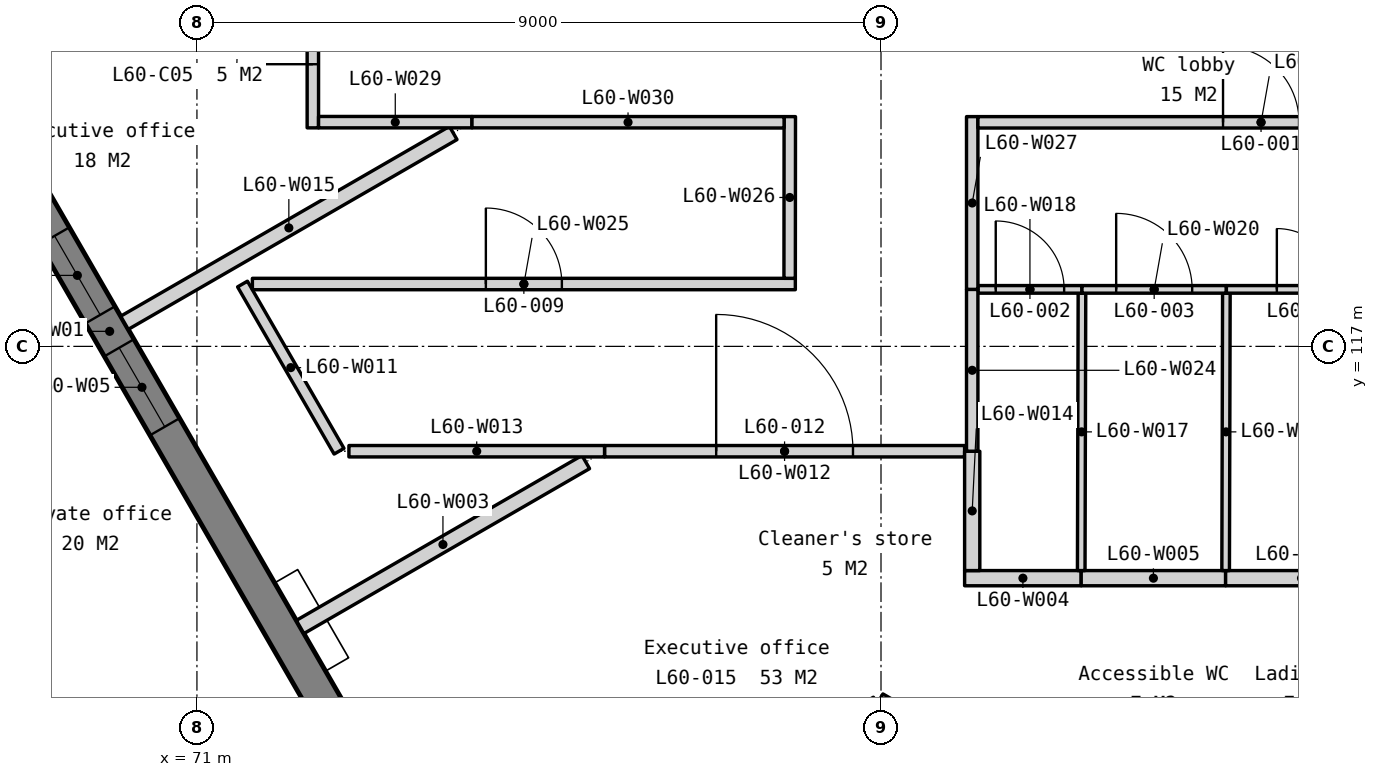
"""IFC4 building model, lengths in metres.
Left out: names, types, materials, properties, quantities, classifications, styles, units other than length and angle.
Written with IfcOpenShell. Run it as: python <this file> out.ifc"""

import sys

from ifc_helpers import new_model, si_unit, direction, frame, frame_2d, origin, place, context, subcontext, project, spatial, polyline, rectangle, outline, extrude, element, fill, save


model = new_model("IFC4")
c1 = context("Model", 3, precision=1e-05, world=origin(), true_north=direction((0.0, 1.0)))
c2 = subcontext(c1, "Body", "Model", "MODEL_VIEW")
j1 = project(units=[si_unit("LENGTHUNIT", "METRE"), si_unit("PLANEANGLEUNIT", "RADIAN")], contexts=[c1])
p1 = place(None, origin())
s1 = spatial("IfcSite", under=j1, at=p1, CompositionType="ELEMENT")
p2 = place(p1, origin())
s2 = spatial("IfcBuilding", under=s1, at=p2, CompositionType="ELEMENT")
p3 = place(p2, frame((0.0, 0.0, 246.5)))
s3 = spatial("IfcBuildingStorey", under=s2, at=p3, CompositionType="ELEMENT", Elevation=246.5)
p4 = place(p3, frame((60.609, 133.207, -0.15), z_axis=(0.0, 0.0, 1.0), x_axis=(0.500002536638, -0.866023939251, 0.0)))
e1 = element("IfcWall", 1, at=p4, inside=s3, PredefinedType="SOLIDWALL", context=c2, shape_type="SweptSolid", body=[
    extrude(outline(polyline([(36.972, 0.0), (36.972, 3.9), (0.0, 3.9), (0.0, 0.0), (36.972, 0.0)])), frame((0.0, 0.225, 0.0), z_axis=(0.0, -1.0, 0.0), x_axis=(1.0, 0.0, 0.0)), (0.0, 0.0, 1.0), 0.45),
])
p5 = place(p4, frame((0.744, 0.0, 0.95)))
e2 = element("IfcOpeningElement", 2, at=p5, cuts=e1, PredefinedType="OPENING", context=c2, shape_type="SweptSolid", body=[
    extrude(rectangle(XDim=1.2, YDim=2.2, at=frame_2d((0.6, 1.1))), frame((0.0, 0.235, 0.0), z_axis=(0.0, -1.0, 0.0), x_axis=(1.0, 0.0, 0.0)), (0.0, 0.0, 1.0), 0.47),
])
p6 = place(p4, frame((7.793, 0.0, 0.95)))
e3 = element("IfcOpeningElement", 3, at=p6, cuts=e1, PredefinedType="OPENING", context=c2, shape_type="SweptSolid", body=[
    extrude(rectangle(XDim=1.2, YDim=2.2, at=frame_2d((0.6, 1.1))), frame((0.0, 0.235, 0.0), z_axis=(0.0, -1.0, 0.0), x_axis=(1.0, 0.0, 0.0)), (0.0, 0.0, 1.0), 0.47),
])
p7 = place(p4, frame((9.493, 0.0, 0.95)))
e4 = element("IfcOpeningElement", 4, at=p7, cuts=e1, PredefinedType="OPENING", context=c2, shape_type="SweptSolid", body=[
    extrude(rectangle(XDim=1.2, YDim=2.2, at=frame_2d((0.6, 1.1))), frame((0.0, 0.235, 0.0), z_axis=(0.0, -1.0, 0.0), x_axis=(1.0, 0.0, 0.0)), (0.0, 0.0, 1.0), 0.47),
])
p8 = place(p4, frame((17.036, 0.0, 0.95)))
e5 = element("IfcOpeningElement", 5, at=p8, cuts=e1, PredefinedType="OPENING", context=c2, shape_type="SweptSolid", body=[
    extrude(rectangle(XDim=1.2, YDim=2.2, at=frame_2d((0.6, 1.1))), frame((0.0, 0.235, 0.0), z_axis=(0.0, -1.0, 0.0), x_axis=(1.0, 0.0, 0.0)), (0.0, 0.0, 1.0), 0.47),
])
p9 = place(p4, frame((18.736, 0.0, 0.95)))
e6 = element("IfcOpeningElement", 6, at=p9, cuts=e1, PredefinedType="OPENING", context=c2, shape_type="SweptSolid", body=[
    extrude(rectangle(XDim=1.2, YDim=2.2, at=frame_2d((0.6, 1.1))), frame((0.0, 0.235, 0.0), z_axis=(0.0, -1.0, 0.0), x_axis=(1.0, 0.0, 0.0)), (0.0, 0.0, 1.0), 0.47),
])
p10 = place(p4, frame((26.279, 0.0, 0.95)))
e7 = element("IfcOpeningElement", 7, at=p10, cuts=e1, PredefinedType="OPENING", context=c2, shape_type="SweptSolid", body=[
    extrude(rectangle(XDim=1.2, YDim=2.2, at=frame_2d((0.6, 1.1))), frame((0.0, 0.235, 0.0), z_axis=(0.0, -1.0, 0.0), x_axis=(1.0, 0.0, 0.0)), (0.0, 0.0, 1.0), 0.47),
])
p11 = place(p4, frame((27.979, 0.0, 0.95)))
e8 = element("IfcOpeningElement", 8, at=p11, cuts=e1, PredefinedType="OPENING", context=c2, shape_type="SweptSolid", body=[
    extrude(rectangle(XDim=1.2, YDim=2.2, at=frame_2d((0.6, 1.1))), frame((0.0, 0.235, 0.0), z_axis=(0.0, -1.0, 0.0), x_axis=(1.0, 0.0, 0.0)), (0.0, 0.0, 1.0), 0.47),
])
p12 = place(p4, frame((35.028, 0.0, 0.95)))
e9 = element("IfcOpeningElement", 9, at=p12, cuts=e1, PredefinedType="OPENING", context=c2, shape_type="SweptSolid", body=[
    extrude(rectangle(XDim=1.2, YDim=2.2, at=frame_2d((0.6, 1.1))), frame((0.0, 0.235, 0.0), z_axis=(0.0, -1.0, 0.0), x_axis=(1.0, 0.0, 0.0)), (0.0, 0.0, 1.0), 0.47),
])
p13 = place(p3, frame((80.905, 101.188, -0.15), z_axis=(0.0, 0.0, 1.0), x_axis=(0.500002536638, 0.866023939251, 0.0)))
e10 = element("IfcWall", 10, at=p13, inside=s3, PredefinedType="SOLIDWALL", context=c2, shape_type="SweptSolid", body=[
    extrude(outline(polyline([(36.972, 0.0), (36.972, 3.9), (0.0, 3.9), (0.0, 0.0), (36.972, 0.0)])), frame((0.0, 0.225, 0.0), z_axis=(0.0, -1.0, 0.0), x_axis=(1.0, 0.0, 0.0)), (0.0, 0.0, 1.0), 0.45),
])
p14 = place(p13, frame((0.744, 0.0, 0.95)))
e11 = element("IfcOpeningElement", 11, at=p14, cuts=e10, PredefinedType="OPENING", context=c2, shape_type="SweptSolid", body=[
    extrude(rectangle(XDim=1.2, YDim=2.2, at=frame_2d((0.6, 1.1))), frame((0.0, 0.235, 0.0), z_axis=(0.0, -1.0, 0.0), x_axis=(1.0, 0.0, 0.0)), (0.0, 0.0, 1.0), 0.47),
])
p15 = place(p13, frame((7.793, 0.0, 0.95)))
e12 = element("IfcOpeningElement", 12, at=p15, cuts=e10, PredefinedType="OPENING", context=c2, shape_type="SweptSolid", body=[
    extrude(rectangle(XDim=1.2, YDim=2.2, at=frame_2d((0.6, 1.1))), frame((0.0, 0.235, 0.0), z_axis=(0.0, -1.0, 0.0), x_axis=(1.0, 0.0, 0.0)), (0.0, 0.0, 1.0), 0.47),
])
p16 = place(p13, frame((9.493, 0.0, 0.95)))
e13 = element("IfcOpeningElement", 13, at=p16, cuts=e10, PredefinedType="OPENING", context=c2, shape_type="SweptSolid", body=[
    extrude(rectangle(XDim=1.2, YDim=2.2, at=frame_2d((0.6, 1.1))), frame((0.0, 0.235, 0.0), z_axis=(0.0, -1.0, 0.0), x_axis=(1.0, 0.0, 0.0)), (0.0, 0.0, 1.0), 0.47),
])
p17 = place(p13, frame((17.036, 0.0, 0.95)))
e14 = element("IfcOpeningElement", 14, at=p17, cuts=e10, PredefinedType="OPENING", context=c2, shape_type="SweptSolid", body=[
    extrude(rectangle(XDim=1.2, YDim=2.2, at=frame_2d((0.6, 1.1))), frame((0.0, 0.235, 0.0), z_axis=(0.0, -1.0, 0.0), x_axis=(1.0, 0.0, 0.0)), (0.0, 0.0, 1.0), 0.47),
])
p18 = place(p13, frame((18.736, 0.0, 0.95)))
e15 = element("IfcOpeningElement", 15, at=p18, cuts=e10, PredefinedType="OPENING", context=c2, shape_type="SweptSolid", body=[
    extrude(rectangle(XDim=1.2, YDim=2.2, at=frame_2d((0.6, 1.1))), frame((0.0, 0.235, 0.0), z_axis=(0.0, -1.0, 0.0), x_axis=(1.0, 0.0, 0.0)), (0.0, 0.0, 1.0), 0.47),
])
p19 = place(p13, frame((26.279, 0.0, 0.95)))
e16 = element("IfcOpeningElement", 16, at=p19, cuts=e10, PredefinedType="OPENING", context=c2, shape_type="SweptSolid", body=[
    extrude(rectangle(XDim=1.2, YDim=2.2, at=frame_2d((0.6, 1.1))), frame((0.0, 0.235, 0.0), z_axis=(0.0, -1.0, 0.0), x_axis=(1.0, 0.0, 0.0)), (0.0, 0.0, 1.0), 0.47),
])
p20 = place(p13, frame((27.979, 0.0, 0.95)))
e17 = element("IfcOpeningElement", 17, at=p20, cuts=e10, PredefinedType="OPENING", context=c2, shape_type="SweptSolid", body=[
    extrude(rectangle(XDim=1.2, YDim=2.2, at=frame_2d((0.6, 1.1))), frame((0.0, 0.235, 0.0), z_axis=(0.0, -1.0, 0.0), x_axis=(1.0, 0.0, 0.0)), (0.0, 0.0, 1.0), 0.47),
])
p21 = place(p13, frame((35.028, 0.0, 0.95)))
e18 = element("IfcOpeningElement", 18, at=p21, cuts=e10, PredefinedType="OPENING", context=c2, shape_type="SweptSolid", body=[
    extrude(rectangle(XDim=1.2, YDim=2.2, at=frame_2d((0.6, 1.1))), frame((0.0, 0.235, 0.0), z_axis=(0.0, -1.0, 0.0), x_axis=(1.0, 0.0, 0.0)), (0.0, 0.0, 1.0), 0.47),
])
p22 = place(p3, frame((80.0, 112.384, 0.0), z_axis=(0.0, 0.0, 1.0), x_axis=(0.866021154418, -0.500007360046, 0.0)))
e19 = element("IfcWall", 19, at=p22, inside=s3, PredefinedType="PARTITIONING", context=c2, shape_type="SweptSolid", body=[
    extrude(rectangle(XDim=6.157, YDim=0.1, at=frame_2d((3.078, 0.0))), origin(), (0.0, 0.0, 1.0), 3.75),
])
p23 = place(p22, frame((2.578, 0.0, 0.0)))
e20 = element("IfcOpeningElement", 20, at=p23, cuts=e19, PredefinedType="OPENING", context=c2, shape_type="SweptSolid", body=[
    extrude(rectangle(XDim=1.0, YDim=2.1, at=frame_2d((0.5, 1.05))), frame((0.0, 0.06, 0.0), z_axis=(0.0, -1.0, 0.0), x_axis=(1.0, 0.0, 0.0)), (0.0, 0.0, 1.0), 0.12),
])
p24 = place(p3, frame((72.357, 113.308, 0.0), z_axis=(0.0, 0.0, 1.0), x_axis=(0.866032891431, 0.499987030792, 0.0)))
e21 = element("IfcWall", 21, at=p24, inside=s3, PredefinedType="PARTITIONING", context=c2, shape_type="SweptSolid", body=[
    extrude(rectangle(XDim=4.34, YDim=0.2, at=frame_2d((2.17, 0.0))), origin(), (0.0, 0.0, 1.0), 3.75),
])
p25 = place(p3, frame((81.1, 113.95, 0.0), z_axis=(0.0, 0.0, 1.0), x_axis=(1.0, 0.0, 0.0)))
e22 = element("IfcWall", 22, at=p25, inside=s3, PredefinedType="PARTITIONING", context=c2, shape_type="SweptSolid", body=[
    extrude(rectangle(XDim=1.534, YDim=0.2, at=frame_2d((0.767, 0.0))), origin(), (0.0, 0.0, 1.0), 3.75),
])
p26 = place(p3, frame((82.634, 113.95, 0.0), z_axis=(0.0, 0.0, 1.0), x_axis=(1.0, 0.0, 0.0)))
e23 = element("IfcWall", 23, at=p26, inside=s3, PredefinedType="PARTITIONING", context=c2, shape_type="SweptSolid", body=[
    extrude(rectangle(XDim=1.9, YDim=0.2, at=frame_2d((0.95, 0.0))), origin(), (0.0, 0.0, 1.0), 3.75),
])
p27 = place(p3, frame((84.534, 113.95, 0.0), z_axis=(0.0, 0.0, 1.0), x_axis=(1.0, 0.0, 0.0)))
e24 = element("IfcWall", 24, at=p27, inside=s3, PredefinedType="PARTITIONING", context=c2, shape_type="SweptSolid", body=[
    extrude(rectangle(XDim=1.997, YDim=0.2, at=frame_2d((0.998, 0.0))), origin(), (0.0, 0.0, 1.0), 3.75),
])
p28 = place(p3, frame((71.6, 117.82, 0.0), z_axis=(0.0, 0.0, 1.0), x_axis=(0.500035802948, -0.866004731956, 0.0)))
e25 = element("IfcWall", 25, at=p28, inside=s3, PredefinedType="PARTITIONING", context=c2, shape_type="SweptSolid", body=[
    extrude(rectangle(XDim=2.54, YDim=0.15, at=frame_2d((1.27, 0.0))), origin(), (0.0, 0.0, 1.0), 3.75),
])
p29 = place(p3, frame((76.363, 115.62, 0.0), z_axis=(0.0, 0.0, 1.0), x_axis=(1.0, 0.0, 0.0)))
e26 = element("IfcWall", 26, at=p29, inside=s3, PredefinedType="PARTITIONING", context=c2, shape_type="SweptSolid", body=[
    extrude(rectangle(XDim=4.737, YDim=0.15, at=frame_2d((2.369, 0.0))), origin(), (0.0, 0.0, 1.0), 3.75),
])
p30 = place(p29, frame((1.469, 0.0, 0.0)))
e27 = element("IfcOpeningElement", 27, at=p30, cuts=e26, PredefinedType="OPENING", context=c2, shape_type="SweptSolid", body=[
    extrude(rectangle(XDim=1.8, YDim=2.1, at=frame_2d((0.9, 1.05))), frame((0.0, 0.085, 0.0), z_axis=(0.0, -1.0, 0.0), x_axis=(1.0, 0.0, 0.0)), (0.0, 0.0, 1.0), 0.17),
])
p31 = place(p3, frame((73.0, 115.62, 0.0), z_axis=(0.0, 0.0, 1.0), x_axis=(1.0, 0.0, 0.0)))
e28 = element("IfcWall", 28, at=p31, inside=s3, PredefinedType="PARTITIONING", context=c2, shape_type="SweptSolid", body=[
    extrude(rectangle(XDim=3.363, YDim=0.15, at=frame_2d((1.682, 0.0))), origin(), (0.0, 0.0, 1.0), 3.75),
])
p32 = place(p3, frame((81.2, 114.05, 0.0), z_axis=(0.0, 0.0, 1.0), x_axis=(0.0, 1.0, 0.0)))
e29 = element("IfcWall", 29, at=p32, inside=s3, PredefinedType="PARTITIONING", context=c2, shape_type="SweptSolid", body=[
    extrude(rectangle(XDim=1.57, YDim=0.2, at=frame_2d((0.785, 0.0))), origin(), (0.0, 0.0, 1.0), 3.75),
])
p33 = place(p3, frame((70.047, 117.31, 0.0), z_axis=(0.0, 0.0, 1.0), x_axis=(0.866032544947, 0.499987630939, 0.0)))
e30 = element("IfcWall", 30, at=p33, inside=s3, PredefinedType="PARTITIONING", context=c2, shape_type="SweptSolid", body=[
    extrude(rectangle(XDim=4.994, YDim=0.2, at=frame_2d((2.497, 0.0))), origin(), (0.0, 0.0, 1.0), 3.75),
])
p34 = place(p3, frame((82.634, 114.05, 0.0), z_axis=(0.0, 0.0, 1.0), x_axis=(0.002608686776, 0.999996597371, 0.0)))
e31 = element("IfcWall", 31, at=p34, inside=s3, PredefinedType="PARTITIONING", context=c2, shape_type="SweptSolid", body=[
    extrude(rectangle(XDim=3.65, YDim=0.1, at=frame_2d((1.825, 0.0))), origin(), (0.0, 0.0, 1.0), 3.75),
])
p35 = place(p3, frame((81.275, 117.75, 0.0), z_axis=(0.0, 0.0, 1.0), x_axis=(1.0, 0.0, 0.0)))
e32 = element("IfcWall", 32, at=p35, inside=s3, PredefinedType="PARTITIONING", context=c2, shape_type="SweptSolid", body=[
    extrude(rectangle(XDim=1.369, YDim=0.1, at=frame_2d((0.685, 0.0))), origin(), (0.0, 0.0, 1.0), 3.75),
])
p36 = place(p35, frame((0.235, 0.0, 0.0)))
e33 = element("IfcOpeningElement", 33, at=p36, cuts=e32, PredefinedType="OPENING", context=c2, shape_type="SweptSolid", body=[
    extrude(rectangle(XDim=0.9, YDim=2.1, at=frame_2d((0.45, 1.05))), frame((0.0, 0.06, 0.0), z_axis=(0.0, -1.0, 0.0), x_axis=(1.0, 0.0, 0.0)), (0.0, 0.0, 1.0), 0.12),
])
p37 = place(p3, frame((84.534, 114.05, 0.0), z_axis=(0.0, 0.0, 1.0), x_axis=(0.002675575707, 0.999996420641, 0.0)))
e34 = element("IfcWall", 34, at=p37, inside=s3, PredefinedType="PARTITIONING", context=c2, shape_type="SweptSolid", body=[
    extrude(rectangle(XDim=3.65, YDim=0.1, at=frame_2d((1.825, 0.0))), origin(), (0.0, 0.0, 1.0), 3.75),
])
p38 = place(p3, frame((82.644, 117.75, 0.0), z_axis=(0.0, 0.0, 1.0), x_axis=(1.0, 0.0, 0.0)))
e35 = element("IfcWall", 35, at=p38, inside=s3, PredefinedType="PARTITIONING", context=c2, shape_type="SweptSolid", body=[
    extrude(rectangle(XDim=1.9, YDim=0.1, at=frame_2d((0.95, 0.0))), origin(), (0.0, 0.0, 1.0), 3.75),
])
p39 = place(p38, frame((0.45, 0.0, 0.0)))
e36 = element("IfcOpeningElement", 36, at=p39, cuts=e35, PredefinedType="OPENING", context=c2, shape_type="SweptSolid", body=[
    extrude(rectangle(XDim=1.0, YDim=2.1, at=frame_2d((0.5, 1.05))), frame((0.0, 0.06, 0.0), z_axis=(0.0, -1.0, 0.0), x_axis=(1.0, 0.0, 0.0)), (0.0, 0.0, 1.0), 0.12),
])
p40 = place(p3, frame((84.544, 117.75, 0.0), z_axis=(0.0, 0.0, 1.0), x_axis=(1.0, 0.0, 0.0)))
e37 = element("IfcWall", 37, at=p40, inside=s3, PredefinedType="PARTITIONING", context=c2, shape_type="SweptSolid", body=[
    extrude(rectangle(XDim=2.128, YDim=0.1, at=frame_2d((1.064, 0.0))), origin(), (0.0, 0.0, 1.0), 3.75),
])
p41 = place(p40, frame((0.664, 0.0, 0.0)))
e38 = element("IfcOpeningElement", 38, at=p41, cuts=e37, PredefinedType="OPENING", context=c2, shape_type="SweptSolid", body=[
    extrude(rectangle(XDim=0.8, YDim=2.1, at=frame_2d((0.4, 1.05))), frame((0.0, 0.06, 0.0), z_axis=(0.0, -1.0, 0.0), x_axis=(1.0, 0.0, 0.0)), (0.0, 0.0, 1.0), 0.12),
])
p42 = place(p3, frame((81.2, 115.62, 0.0), z_axis=(0.0, 0.0, 1.0), x_axis=(0.0, 1.0, 0.0)))
e39 = element("IfcWall", 39, at=p42, inside=s3, PredefinedType="PARTITIONING", context=c2, shape_type="SweptSolid", body=[
    extrude(rectangle(XDim=2.13, YDim=0.15, at=frame_2d((1.065, 0.0))), origin(), (0.0, 0.0, 1.0), 3.75),
])
p43 = place(p3, frame((71.729, 117.82, 0.0), z_axis=(0.0, 0.0, 1.0), x_axis=(1.0, 0.0, 0.0)))
e40 = element("IfcWall", 40, at=p43, inside=s3, PredefinedType="PARTITIONING", context=c2, shape_type="SweptSolid", body=[
    extrude(rectangle(XDim=7.144, YDim=0.15, at=frame_2d((3.572, 0.0))), origin(), (0.0, 0.0, 1.0), 3.75),
])
p44 = place(p43, frame((3.072, 0.0, 0.0)))
e41 = element("IfcOpeningElement", 41, at=p44, cuts=e40, PredefinedType="OPENING", context=c2, shape_type="SweptSolid", body=[
    extrude(rectangle(XDim=1.0, YDim=2.1, at=frame_2d((0.5, 1.05))), frame((0.0, 0.085, 0.0), z_axis=(0.0, -1.0, 0.0), x_axis=(1.0, 0.0, 0.0)), (0.0, 0.0, 1.0), 0.17),
])
p45 = place(p3, frame((78.798, 117.895, 0.0), z_axis=(0.0, 0.0, 1.0), x_axis=(0.000917957158, 0.999999578677, 0.0)))
e42 = element("IfcWall", 42, at=p45, inside=s3, PredefinedType="PARTITIONING", context=c2, shape_type="SweptSolid", body=[
    extrude(rectangle(XDim=2.128, YDim=0.15, at=frame_2d((1.064, 0.0))), origin(), (0.0, 0.0, 1.0), 3.75),
])
p46 = place(p3, frame((81.2, 117.75, 0.0), z_axis=(0.0, 0.0, 1.0), x_axis=(0.0, 1.0, 0.0)))
e43 = element("IfcWall", 43, at=p46, inside=s3, PredefinedType="PARTITIONING", context=c2, shape_type="SweptSolid", body=[
    extrude(rectangle(XDim=2.273, YDim=0.15, at=frame_2d((1.136, 0.0))), origin(), (0.0, 0.0, 1.0), 3.75),
])
p47 = place(p3, frame((72.525, 119.875, 0.0), z_axis=(0.0, 0.0, 1.0), x_axis=(0.0, 1.0, 0.0)))
e44 = element("IfcWall", 44, at=p47, inside=s3, PredefinedType="PARTITIONING", context=c2, shape_type="SweptSolid", body=[
    extrude(rectangle(XDim=2.675, YDim=0.15, at=frame_2d((1.337, 0.0))), origin(), (0.0, 0.0, 1.0), 3.75),
])
p48 = place(p47, frame((0.837, 0.0, 0.0)))
e45 = element("IfcOpeningElement", 45, at=p48, cuts=e44, PredefinedType="OPENING", context=c2, shape_type="SweptSolid", body=[
    extrude(rectangle(XDim=1.0, YDim=2.1, at=frame_2d((0.5, 1.05))), frame((0.0, 0.085, 0.0), z_axis=(0.0, -1.0, 0.0), x_axis=(1.0, 0.0, 0.0)), (0.0, 0.0, 1.0), 0.17),
])
p49 = place(p3, frame((72.6, 119.95, 0.0), z_axis=(0.0, 0.0, 1.0), x_axis=(1.0, 0.0, 0.0)))
e46 = element("IfcWall", 46, at=p49, inside=s3, PredefinedType="PARTITIONING", context=c2, shape_type="SweptSolid", body=[
    extrude(rectangle(XDim=2.019, YDim=0.15, at=frame_2d((1.009, 0.0))), origin(), (0.0, 0.0, 1.0), 3.75),
])
p50 = place(p3, frame((74.619, 119.95, 0.0), z_axis=(0.0, 0.0, 1.0), x_axis=(0.999999886891, -0.000475624203, 0.0)))
e47 = element("IfcWall", 47, at=p50, inside=s3, PredefinedType="PARTITIONING", context=c2, shape_type="SweptSolid", body=[
    extrude(rectangle(XDim=4.106, YDim=0.15, at=frame_2d((2.053, 0.0))), origin(), (0.0, 0.0, 1.0), 3.75),
])
p51 = place(p3, frame((81.275, 119.948, 0.0), z_axis=(0.0, 0.0, 1.0), x_axis=(1.0, 0.0, 0.0)))
e48 = element("IfcWall", 48, at=p51, inside=s3, PredefinedType="PARTITIONING", context=c2, shape_type="SweptSolid", body=[
    extrude(rectangle(XDim=7.45, YDim=0.15, at=frame_2d((3.725, 0.0))), origin(), (0.0, 0.0, 1.0), 3.75),
])
p52 = place(p51, frame((3.225, 0.0, 0.0)))
e49 = element("IfcOpeningElement", 49, at=p52, cuts=e48, PredefinedType="OPENING", context=c2, shape_type="SweptSolid", body=[
    extrude(rectangle(XDim=1.0, YDim=2.1, at=frame_2d((0.5, 1.05))), frame((0.0, 0.085, 0.0), z_axis=(0.0, -1.0, 0.0), x_axis=(1.0, 0.0, 0.0)), (0.0, 0.0, 1.0), 0.17),
])
p53 = place(p8, origin())
e50 = element("IfcWindow", 50, at=p53, inside=s3, PartitioningType="SINGLE_PANEL", PredefinedType="WINDOW", context=c2, shape_type="SweptSolid", body=[
    extrude(rectangle(XDim=1.2, YDim=2.2, at=frame_2d((0.6, 1.1))), frame((0.0, 0.03, 0.0), z_axis=(0.0, -1.0, 0.0), x_axis=(1.0, 0.0, 0.0)), (0.0, 0.0, 1.0), 0.06),
])
fill(e5, e50)
p54 = place(p9, origin())
e51 = element("IfcWindow", 51, at=p54, inside=s3, PartitioningType="SINGLE_PANEL", PredefinedType="WINDOW", context=c2, shape_type="SweptSolid", body=[
    extrude(rectangle(XDim=1.2, YDim=2.2, at=frame_2d((0.6, 1.1))), frame((0.0, 0.03, 0.0), z_axis=(0.0, -1.0, 0.0), x_axis=(1.0, 0.0, 0.0)), (0.0, 0.0, 1.0), 0.06),
])
fill(e6, e51)
p55 = place(p52, origin())
e52 = element("IfcDoor", 52, at=p55, inside=s3, OperationType="SINGLE_SWING_LEFT", PredefinedType="DOOR", context=c2, shape_type="SweptSolid", body=[
    extrude(rectangle(XDim=1.0, YDim=2.1, at=frame_2d((0.5, 1.05))), frame((0.0, 0.025, 0.0), z_axis=(0.0, -1.0, 0.0), x_axis=(1.0, 0.0, 0.0)), (0.0, 0.0, 1.0), 0.05),
])
fill(e49, e52)
p56 = place(p36, origin())
e53 = element("IfcDoor", 53, at=p56, inside=s3, OperationType="SINGLE_SWING_LEFT", PredefinedType="DOOR", context=c2, shape_type="SweptSolid", body=[
    extrude(rectangle(XDim=0.9, YDim=2.1, at=frame_2d((0.45, 1.05))), frame((0.0, 0.025, 0.0), z_axis=(0.0, -1.0, 0.0), x_axis=(1.0, 0.0, 0.0)), (0.0, 0.0, 1.0), 0.05),
])
fill(e33, e53)
p57 = place(p39, origin())
e54 = element("IfcDoor", 54, at=p57, inside=s3, OperationType="SINGLE_SWING_LEFT", PredefinedType="DOOR", context=c2, shape_type="SweptSolid", body=[
    extrude(rectangle(XDim=1.0, YDim=2.1, at=frame_2d((0.5, 1.05))), frame((0.0, 0.025, 0.0), z_axis=(0.0, -1.0, 0.0), x_axis=(1.0, 0.0, 0.0)), (0.0, 0.0, 1.0), 0.05),
])
fill(e36, e54)
p58 = place(p41, origin())
e55 = element("IfcDoor", 55, at=p58, inside=s3, OperationType="SINGLE_SWING_LEFT", PredefinedType="DOOR", context=c2, shape_type="SweptSolid", body=[
    extrude(rectangle(XDim=0.8, YDim=2.1, at=frame_2d((0.4, 1.05))), frame((0.0, 0.025, 0.0), z_axis=(0.0, -1.0, 0.0), x_axis=(1.0, 0.0, 0.0)), (0.0, 0.0, 1.0), 0.05),
])
fill(e38, e55)
p59 = place(p48, origin())
e56 = element("IfcDoor", 56, at=p59, inside=s3, OperationType="SINGLE_SWING_LEFT", PredefinedType="DOOR", context=c2, shape_type="SweptSolid", body=[
    extrude(rectangle(XDim=1.0, YDim=2.1, at=frame_2d((0.5, 1.05))), frame((0.0, 0.025, 0.0), z_axis=(0.0, -1.0, 0.0), x_axis=(1.0, 0.0, 0.0)), (0.0, 0.0, 1.0), 0.05),
])
fill(e45, e56)
p60 = place(p44, origin())
e57 = element("IfcDoor", 57, at=p60, inside=s3, OperationType="SINGLE_SWING_LEFT", PredefinedType="DOOR", context=c2, shape_type="SweptSolid", body=[
    extrude(rectangle(XDim=1.0, YDim=2.1, at=frame_2d((0.5, 1.05))), frame((0.0, 0.025, 0.0), z_axis=(0.0, -1.0, 0.0), x_axis=(1.0, 0.0, 0.0)), (0.0, 0.0, 1.0), 0.05),
])
fill(e41, e57)
p61 = place(p30, origin())
e58 = element("IfcDoor", 58, at=p61, inside=s3, OperationType="SINGLE_SWING_LEFT", PredefinedType="DOOR", context=c2, shape_type="SweptSolid", body=[
    extrude(rectangle(XDim=1.8, YDim=2.1, at=frame_2d((0.9, 1.05))), frame((0.0, 0.025, 0.0), z_axis=(0.0, -1.0, 0.0), x_axis=(1.0, 0.0, 0.0)), (0.0, 0.0, 1.0), 0.05),
])
fill(e27, e58)
save(model, sys.argv[1])
